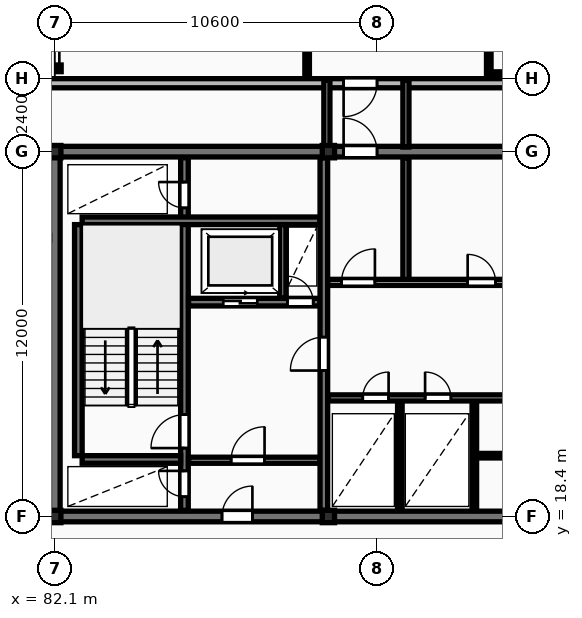
"""IFC4 building model, lengths in metres.
Left out: names, types, materials, properties, quantities, classifications, styles, units other than length and angle.
Written with IfcOpenShell. Run it as: python <this file> out.ifc"""

import sys

from ifc_helpers import new_model, si_unit, direction, frame, frame_2d, origin, origin_2d, place, context, subcontext, project, spatial, rectangle, i_section, extrude, element, fill, save


model = new_model("IFC4")
c1 = context("Model", 3, precision=1e-05, world=origin(), true_north=direction((0.0, 1.0)))
c2 = subcontext(c1, "Body", "Model", "MODEL_VIEW")
j1 = project(units=[si_unit("LENGTHUNIT", "METRE"), si_unit("PLANEANGLEUNIT", "RADIAN")], contexts=[c1])
p1 = place(None, origin())
s1 = spatial("IfcSite", under=j1, at=p1, CompositionType="ELEMENT")
p2 = place(p1, origin())
s2 = spatial("IfcBuilding", under=s1, at=p2, CompositionType="ELEMENT")
p3 = place(p2, frame((0.0, 0.0, 150.1)))
s3 = spatial("IfcBuildingStorey", under=s2, at=p3, CompositionType="ELEMENT", Elevation=150.1)
for number, where, z_axis, x_axis in (
    (1, (82.1, 18.4, 0.0), (0.0, 0.0, 1.0), (1.0, 0.0, 0.0)),
    (2, (82.1, 30.4, 0.0), (0.0, 0.0, 1.0), (1.0, 0.0, 0.0)),
    (3, (91.1, 18.4, 0.0), (0.0, 0.0, 1.0), (1.0, 0.0, 0.0)),
    (4, (91.1, 30.4, 0.0), (0.0, 0.0, 1.0), (1.0, 0.0, 0.0)),
):
    element("IfcColumn", number, at=place(p3, frame(where, z_axis=z_axis, x_axis=x_axis)), inside=s3, PredefinedType="COLUMN", context=c2, shape_type="SweptSolid", body=[
        extrude(i_section(OverallWidth=0.403, OverallDepth=0.406, WebThickness=0.027, FlangeThickness=0.043, FilletRadius=0.015, at=origin_2d()), origin(), (0.0, 0.0, 1.0), 3.6),
    ])
p4 = place(p3, frame((130.7, 32.65, 0.0), z_axis=(0.0, 0.0, 1.0), x_axis=(-1.0, 0.0, 0.0)))
e5 = element("IfcWall", 5, at=p4, inside=s3, PredefinedType="STANDARD", context=c2, shape_type="SweptSolid", body=[
    extrude(rectangle(XDim=58.0, YDim=0.3, at=frame_2d((29.0, 0.0))), origin(), (0.0, 0.0, 1.0), 3.31),
])
p5 = place(p4, frame((50.125, 0.0, 0.85)))
e6 = element("IfcOpeningElement", 6, at=p5, cuts=e5, PredefinedType="OPENING", context=c2, shape_type="SweptSolid", body=[
    extrude(rectangle(XDim=1.8, YDim=1.8, at=frame_2d((0.9, 0.9))), frame((0.0, 0.16, 0.0), z_axis=(0.0, -1.0, 0.0), x_axis=(1.0, 0.0, 0.0)), (0.0, 0.0, 1.0), 0.32),
])
p6 = place(p4, frame((6.775, 0.0, 0.85)))
e7 = element("IfcOpeningElement", 7, at=p6, cuts=e5, PredefinedType="OPENING", context=c2, shape_type="SweptSolid", body=[
    extrude(rectangle(XDim=1.8, YDim=1.8, at=frame_2d((0.9, 0.9))), frame((0.0, 0.16, 0.0), z_axis=(0.0, -1.0, 0.0), x_axis=(1.0, 0.0, 0.0)), (0.0, 0.0, 1.0), 0.32),
])
p7 = place(p4, frame((38.0, 0.0, 0.0)))
e8 = element("IfcOpeningElement", 8, at=p7, cuts=e5, PredefinedType="OPENING", context=c2, shape_type="SweptSolid", body=[
    extrude(rectangle(XDim=1.1, YDim=2.1, at=frame_2d((0.55, 1.05))), frame((0.0, 0.16, 0.0), z_axis=(0.0, -1.0, 0.0), x_axis=(1.0, 0.0, 0.0)), (0.0, 0.0, 1.0), 0.32),
])
p8 = place(p3, frame((81.925, 30.4, 0.0), z_axis=(0.0, 0.0, 1.0), x_axis=(1.0, 0.0, 0.0)))
e9 = element("IfcWall", 9, at=p8, inside=s3, PredefinedType="SHEAR", context=c2, shape_type="SweptSolid", body=[
    extrude(rectangle(XDim=36.265, YDim=0.35, at=frame_2d((18.132, 0.0))), origin(), (0.0, 0.0, 1.0), 3.6),
])
p9 = place(p8, frame((9.675, 0.0, 0.0)))
e10 = element("IfcOpeningElement", 10, at=p9, cuts=e9, PredefinedType="OPENING", context=c2, shape_type="SweptSolid", body=[
    extrude(rectangle(XDim=1.1, YDim=2.1, at=frame_2d((0.55, 1.05))), frame((0.0, 0.185, 0.0), z_axis=(0.0, -1.0, 0.0), x_axis=(1.0, 0.0, 0.0)), (0.0, 0.0, 1.0), 0.37),
])
p10 = place(p3, frame((82.1, 18.575, 0.0), z_axis=(0.0, 0.0, 1.0), x_axis=(0.0, 1.0, 0.0)))
e11 = element("IfcWall", 11, at=p10, inside=s3, PredefinedType="SHEAR", context=c2, shape_type="SweptSolid", body=[
    extrude(rectangle(XDim=11.65, YDim=0.35, at=frame_2d((5.825, 0.0))), origin(), (0.0, 0.0, 1.0), 3.6),
])
p11 = place(p3, frame((81.925, 18.4, 0.0), z_axis=(0.0, 0.0, 1.0), x_axis=(1.0, 0.0, 0.0)))
e12 = element("IfcWall", 12, at=p11, inside=s3, PredefinedType="SHEAR", context=c2, shape_type="SweptSolid", body=[
    extrude(rectangle(XDim=36.265, YDim=0.35, at=frame_2d((18.132, 0.0))), origin(), (0.0, 0.0, 1.0), 3.6),
])
p12 = place(p11, frame((5.675, 0.0, 0.0)))
e13 = element("IfcOpeningElement", 13, at=p12, cuts=e12, PredefinedType="OPENING", context=c2, shape_type="SweptSolid", body=[
    extrude(rectangle(XDim=1.0, YDim=2.15, at=frame_2d((0.5, 1.075))), frame((0.0, 0.185, 0.0), z_axis=(0.0, -1.0, 0.0), x_axis=(1.0, 0.0, 0.0)), (0.0, 0.0, 1.0), 0.37),
])
p13 = place(p11, frame((21.925, 0.0, 0.0)))
e14 = element("IfcOpeningElement", 14, at=p13, cuts=e12, PredefinedType="OPENING", context=c2, shape_type="SweptSolid", body=[
    extrude(rectangle(XDim=1.5, YDim=2.2, at=frame_2d((0.75, 1.1))), frame((0.0, 0.185, 0.0), z_axis=(0.0, -1.0, 0.0), x_axis=(1.0, 0.0, 0.0)), (0.0, 0.0, 1.0), 0.37),
])
p14 = place(p11, frame((29.875, 0.0, 0.0)))
e15 = element("IfcOpeningElement", 15, at=p14, cuts=e12, PredefinedType="OPENING", context=c2, shape_type="SweptSolid", body=[
    extrude(rectangle(XDim=1.0, YDim=2.15, at=frame_2d((0.5, 1.075))), frame((0.0, 0.185, 0.0), z_axis=(0.0, -1.0, 0.0), x_axis=(1.0, 0.0, 0.0)), (0.0, 0.0, 1.0), 0.37),
])
p15 = place(p3, frame((82.875, 20.4, 0.0), z_axis=(0.0, 0.0, 1.0), x_axis=(0.0, 1.0, 0.0)))
e16 = element("IfcWall", 16, at=p15, inside=s3, PredefinedType="SHEAR", context=c2, shape_type="SweptSolid", body=[
    extrude(rectangle(XDim=7.6, YDim=0.25, at=frame_2d((3.8, 0.0))), origin(), (0.0, 0.0, 1.0), 3.6),
])
p16 = place(p3, frame((86.365, 18.6, 0.0), z_axis=(0.0, 0.0, 1.0), x_axis=(0.0, 1.0, 0.0)))
e17 = element("IfcWall", 17, at=p16, inside=s3, PredefinedType="SHEAR", context=c2, shape_type="SweptSolid", body=[
    extrude(rectangle(XDim=11.6, YDim=0.25, at=frame_2d((5.8, 0.0))), origin(), (0.0, 0.0, 1.0), 3.6),
])
p17 = place(p16, frame((0.45, 0.0, 0.0)))
e18 = element("IfcOpeningElement", 18, at=p17, cuts=e17, PredefinedType="OPENING", context=c2, shape_type="SweptSolid", body=[
    extrude(rectangle(XDim=0.85, YDim=2.05, at=frame_2d((0.425, 1.025))), frame((0.0, 0.135, 0.0), z_axis=(0.0, -1.0, 0.0), x_axis=(1.0, 0.0, 0.0)), (0.0, 0.0, 1.0), 0.27),
])
p18 = place(p16, frame((2.05, 0.0, 0.0)))
e19 = element("IfcOpeningElement", 19, at=p18, cuts=e17, PredefinedType="OPENING", context=c2, shape_type="SweptSolid", body=[
    extrude(rectangle(XDim=1.1, YDim=2.1, at=frame_2d((0.55, 1.05))), frame((0.0, 0.135, 0.0), z_axis=(0.0, -1.0, 0.0), x_axis=(1.0, 0.0, 0.0)), (0.0, 0.0, 1.0), 0.27),
])
p19 = place(p16, frame((9.95, 0.0, 0.0)))
e20 = element("IfcOpeningElement", 20, at=p19, cuts=e17, PredefinedType="OPENING", context=c2, shape_type="SweptSolid", body=[
    extrude(rectangle(XDim=0.85, YDim=2.05, at=frame_2d((0.425, 1.025))), frame((0.0, 0.135, 0.0), z_axis=(0.0, -1.0, 0.0), x_axis=(1.0, 0.0, 0.0)), (0.0, 0.0, 1.0), 0.27),
])
p20 = place(p3, frame((83.0, 20.275, 0.0), z_axis=(0.0, 0.0, 1.0), x_axis=(1.0, 0.0, 0.0)))
e21 = element("IfcWall", 21, at=p20, inside=s3, PredefinedType="SHEAR", context=c2, shape_type="SweptSolid", body=[
    extrude(rectangle(XDim=3.24, YDim=0.25, at=frame_2d((1.62, 0.0))), origin(), (0.0, 0.0, 1.0), 3.6),
])
p21 = place(p3, frame((83.0, 28.125, 0.0), z_axis=(0.0, 0.0, 1.0), x_axis=(1.0, 0.0, 0.0)))
e22 = element("IfcWall", 22, at=p21, inside=s3, PredefinedType="SHEAR", context=c2, shape_type="SweptSolid", body=[
    extrude(rectangle(XDim=7.82, YDim=0.25, at=frame_2d((3.91, 0.0))), origin(), (0.0, 0.0, 1.0), 3.6),
])
p22 = place(p3, frame((86.5, 25.45, 0.0), z_axis=(0.0, 0.0, 1.0), x_axis=(1.0, 0.0, 0.0)))
e23 = element("IfcWall", 23, at=p22, inside=s3, PredefinedType="SHEAR", context=c2, shape_type="SweptSolid", body=[
    extrude(rectangle(XDim=4.32, YDim=0.25, at=frame_2d((2.16, 0.0))), origin(), (0.0, 0.0, 1.0), 3.6),
])
p23 = place(p22, frame((1.14, 0.0, 0.0)))
e24 = element("IfcOpeningElement", 24, at=p23, cuts=e23, PredefinedType="OPENING", context=c2, shape_type="SweptSolid", body=[
    extrude(rectangle(XDim=1.12, YDim=2.12, at=frame_2d((0.56, 1.06))), frame((0.0, 0.135, 0.0), z_axis=(0.0, -1.0, 0.0), x_axis=(1.0, 0.0, 0.0)), (0.0, 0.0, 1.0), 0.27),
])
p24 = place(p22, frame((3.25, 0.0, 0.0)))
e25 = element("IfcOpeningElement", 25, at=p24, cuts=e23, PredefinedType="OPENING", context=c2, shape_type="SweptSolid", body=[
    extrude(rectangle(XDim=0.85, YDim=2.05, at=frame_2d((0.425, 1.025))), frame((0.0, 0.135, 0.0), z_axis=(0.0, -1.0, 0.0), x_axis=(1.0, 0.0, 0.0)), (0.0, 0.0, 1.0), 0.27),
])
p25 = place(p3, frame((89.6, 25.58, 0.0), z_axis=(0.0, 0.0, 1.0), x_axis=(0.0, 1.0, 0.0)))
e26 = element("IfcWall", 26, at=p25, inside=s3, PredefinedType="PARTITIONING", context=c2, shape_type="SweptSolid", body=[
    extrude(rectangle(XDim=2.42, YDim=0.2, at=frame_2d((1.21, 0.0))), origin(), (0.0, 0.0, 1.0), 3.31),
])
p26 = place(p3, frame((86.5, 20.25, 0.0), z_axis=(0.0, 0.0, 1.0), x_axis=(1.0, 0.0, 0.0)))
e27 = element("IfcWall", 27, at=p26, inside=s3, PredefinedType="PARTITIONING", context=c2, shape_type="SweptSolid", body=[
    extrude(rectangle(XDim=4.32, YDim=0.2, at=frame_2d((2.16, 0.0))), origin(), (0.0, 0.0, 1.0), 3.31),
])
p27 = place(p26, frame((1.4, 0.0, 0.0)))
e28 = element("IfcOpeningElement", 28, at=p27, cuts=e27, PredefinedType="OPENING", context=c2, shape_type="SweptSolid", body=[
    extrude(rectangle(XDim=1.1, YDim=2.1, at=frame_2d((0.55, 1.05))), frame((0.0, 0.11, 0.0), z_axis=(0.0, -1.0, 0.0), x_axis=(1.0, 0.0, 0.0)), (0.0, 0.0, 1.0), 0.22),
])
p28 = place(p3, frame((90.95, 18.6, 0.0), z_axis=(0.0, 0.0, 1.0), x_axis=(0.0, 1.0, 0.0)))
e29 = element("IfcWall", 29, at=p28, inside=s3, PredefinedType="SHEAR", context=c2, shape_type="SweptSolid", body=[
    extrude(rectangle(XDim=11.6, YDim=0.25, at=frame_2d((5.8, 0.0))), origin(), (0.0, 0.0, 1.0), 3.6),
])
p29 = place(p28, frame((4.6, 0.0, 0.0)))
e30 = element("IfcOpeningElement", 30, at=p29, cuts=e29, PredefinedType="OPENING", context=c2, shape_type="SweptSolid", body=[
    extrude(rectangle(XDim=1.1, YDim=2.1, at=frame_2d((0.55, 1.05))), frame((0.0, 0.135, 0.0), z_axis=(0.0, -1.0, 0.0), x_axis=(1.0, 0.0, 0.0)), (0.0, 0.0, 1.0), 0.27),
])
p30 = place(p3, frame((93.65, 26.1, 0.0), z_axis=(0.0, 0.0, 1.0), x_axis=(0.0, 1.0, 0.0)))
e31 = element("IfcWall", 31, at=p30, inside=s3, PredefinedType="PARTITIONING", context=c2, shape_type="SweptSolid", body=[
    extrude(rectangle(XDim=4.1, YDim=0.2, at=frame_2d((2.05, 0.0))), origin(), (0.0, 0.0, 1.0), 3.31),
])
p31 = place(p3, frame((91.08, 26.1, 0.0), z_axis=(0.0, 0.0, 1.0), x_axis=(1.0, 0.0, 0.0)))
e32 = element("IfcWall", 32, at=p31, inside=s3, PredefinedType="PARTITIONING", context=c2, shape_type="SweptSolid", body=[
    extrude(rectangle(XDim=8.34, YDim=0.2, at=frame_2d((4.17, 0.0))), origin(), (0.0, 0.0, 1.0), 3.31),
])
p32 = place(p31, frame((0.45, 0.0, 0.0)))
e33 = element("IfcOpeningElement", 33, at=p32, cuts=e32, PredefinedType="OPENING", context=c2, shape_type="SweptSolid", body=[
    extrude(rectangle(XDim=1.1, YDim=2.1, at=frame_2d((0.55, 1.05))), frame((0.0, 0.11, 0.0), z_axis=(0.0, -1.0, 0.0), x_axis=(1.0, 0.0, 0.0)), (0.0, 0.0, 1.0), 0.22),
])
p33 = place(p31, frame((4.6, 0.0, 0.0)))
e34 = element("IfcOpeningElement", 34, at=p33, cuts=e32, PredefinedType="OPENING", context=c2, shape_type="SweptSolid", body=[
    extrude(rectangle(XDim=0.92, YDim=2.08, at=frame_2d((0.46, 1.04))), frame((0.0, 0.11, 0.0), z_axis=(0.0, -1.0, 0.0), x_axis=(1.0, 0.0, 0.0)), (0.0, 0.0, 1.0), 0.22),
])
for number, where, z_axis, x_axis in (
    (35, (93.45, 18.6, 0.0), (0.0, 0.0, 1.0), (0.0, 1.0, 0.0)),
    (36, (95.9, 18.6, 0.0), (0.0, 0.0, 1.0), (0.0, 1.0, 0.0)),
):
    element("IfcWall", number, at=place(p3, frame(where, z_axis=z_axis, x_axis=x_axis)), inside=s3, PredefinedType="PARTITIONING", context=c2, shape_type="SweptSolid", body=[
        extrude(rectangle(XDim=3.6, YDim=0.15, at=frame_2d((1.8, 0.0))), origin(), (0.0, 0.0, 1.0), 3.31),
    ])
p34 = place(p3, frame((95.9, 20.4, 0.0), z_axis=(0.0, 0.0, 1.0), x_axis=(1.0, 0.0, 0.0)))
e37 = element("IfcWall", 37, at=p34, inside=s3, PredefinedType="PARTITIONING", context=c2, shape_type="SweptSolid", body=[
    extrude(rectangle(XDim=6.7, YDim=0.15, at=frame_2d((3.35, 0.0))), origin(), (0.0, 0.0, 1.0), 3.31),
])
p35 = place(p34, frame((1.6, 0.0, 0.0)))
e38 = element("IfcOpeningElement", 38, at=p35, cuts=e37, PredefinedType="OPENING", context=c2, shape_type="SweptSolid", body=[
    extrude(rectangle(XDim=0.88, YDim=2.06, at=frame_2d((0.44, 1.03))), frame((0.0, 0.085, 0.0), z_axis=(0.0, -1.0, 0.0), x_axis=(1.0, 0.0, 0.0)), (0.0, 0.0, 1.0), 0.17),
])
p36 = place(p3, frame((91.08, 22.3, 0.0), z_axis=(0.0, 0.0, 1.0), x_axis=(1.0, 0.0, 0.0)))
e39 = element("IfcWall", 39, at=p36, inside=s3, PredefinedType="PARTITIONING", context=c2, shape_type="SweptSolid", body=[
    extrude(rectangle(XDim=19.14, YDim=0.2, at=frame_2d((9.57, 0.0))), origin(), (0.0, 0.0, 1.0), 3.31),
])
p37 = place(p36, frame((1.15, 0.0, 0.0)))
e40 = element("IfcOpeningElement", 40, at=p37, cuts=e39, PredefinedType="OPENING", context=c2, shape_type="SweptSolid", body=[
    extrude(rectangle(XDim=0.85, YDim=2.05, at=frame_2d((0.425, 1.025))), frame((0.0, 0.11, 0.0), z_axis=(0.0, -1.0, 0.0), x_axis=(1.0, 0.0, 0.0)), (0.0, 0.0, 1.0), 0.22),
])
p38 = place(p36, frame((3.2, 0.0, 0.0)))
e41 = element("IfcOpeningElement", 41, at=p38, cuts=e39, PredefinedType="OPENING", context=c2, shape_type="SweptSolid", body=[
    extrude(rectangle(XDim=0.85, YDim=2.05, at=frame_2d((0.425, 1.025))), frame((0.0, 0.11, 0.0), z_axis=(0.0, -1.0, 0.0), x_axis=(1.0, 0.0, 0.0)), (0.0, 0.0, 1.0), 0.22),
])
p39 = place(p36, frame((12.72, 0.0, 0.0)))
e42 = element("IfcOpeningElement", 42, at=p39, cuts=e39, PredefinedType="OPENING", context=c2, shape_type="SweptSolid", body=[
    extrude(rectangle(XDim=1.5, YDim=2.2, at=frame_2d((0.75, 1.1))), frame((0.0, 0.11, 0.0), z_axis=(0.0, -1.0, 0.0), x_axis=(1.0, 0.0, 0.0)), (0.0, 0.0, 1.0), 0.22),
])
p40 = place(p36, frame((6.42, 0.0, 0.0)))
e43 = element("IfcOpeningElement", 43, at=p40, cuts=e39, PredefinedType="OPENING", context=c2, shape_type="SweptSolid", body=[
    extrude(rectangle(XDim=0.92, YDim=2.08, at=frame_2d((0.46, 1.04))), frame((0.0, 0.11, 0.0), z_axis=(0.0, -1.0, 0.0), x_axis=(1.0, 0.0, 0.0)), (0.0, 0.0, 1.0), 0.22),
])
p41 = place(p36, frame((15.92, 0.0, 0.0)))
e44 = element("IfcOpeningElement", 44, at=p41, cuts=e39, PredefinedType="OPENING", context=c2, shape_type="SweptSolid", body=[
    extrude(rectangle(XDim=0.88, YDim=2.06, at=frame_2d((0.44, 1.03))), frame((0.0, 0.11, 0.0), z_axis=(0.0, -1.0, 0.0), x_axis=(1.0, 0.0, 0.0)), (0.0, 0.0, 1.0), 0.22),
])
p42 = place(p3, frame((91.05, 30.55, 0.0), z_axis=(0.0, 0.0, 1.0), x_axis=(0.0, 1.0, 0.0)))
e45 = element("IfcWall", 45, at=p42, inside=s3, PredefinedType="PARTITIONING", context=c2, shape_type="SweptSolid", body=[
    extrude(rectangle(XDim=2.2, YDim=0.2, at=frame_2d((1.1, 0.0))), origin(), (0.0, 0.0, 1.0), 3.31),
])
p43 = place(p3, frame((93.65, 30.55, 0.0), z_axis=(0.0, 0.0, 1.0), x_axis=(0.0, 1.0, 0.0)))
e46 = element("IfcWall", 46, at=p43, inside=s3, PredefinedType="PARTITIONING", context=c2, shape_type="SweptSolid", body=[
    extrude(rectangle(XDim=2.2, YDim=0.2, at=frame_2d((1.1, 0.0))), origin(), (0.0, 0.0, 1.0), 2.389),
])
p44 = place(p3, frame((96.375, 32.95, 0.0), z_axis=(0.0, 0.0, 1.0), x_axis=(1.0, 0.0, 0.0)))
e47 = element("IfcWall", 47, at=p44, inside=s3, PredefinedType="PARTITIONING", context=c2, shape_type="SweptSolid", body=[
    extrude(rectangle(XDim=3.31, YDim=0.15, at=frame_2d((1.655, 0.0))), origin(), (0.0, 0.0, 1.0), 2.69),
])
p45 = place(p3, frame((96.375, 32.95, 0.0), z_axis=(0.0, 0.0, 1.0), x_axis=(0.0, 1.0, 0.0)))
e48 = element("IfcWall", 48, at=p45, inside=s3, PredefinedType="PARTITIONING", context=c2, shape_type="SweptSolid", body=[
    extrude(rectangle(XDim=4.725, YDim=0.15, at=frame_2d((2.363, 0.0))), origin(), (0.0, 0.0, 1.0), 2.389),
])
p46 = place(p45, frame((1.6, 0.0, 0.0)))
e49 = element("IfcOpeningElement", 49, at=p46, cuts=e48, PredefinedType="OPENING", context=c2, shape_type="SweptSolid", body=[
    extrude(rectangle(XDim=0.96, YDim=2.1, at=frame_2d((0.48, 1.05))), frame((0.0, 0.085, 0.0), z_axis=(0.0, -1.0, 0.0), x_axis=(1.0, 0.0, 0.0)), (0.0, 0.0, 1.0), 0.17),
])
p47 = place(p3, frame((90.4, 32.9, 0.0), z_axis=(0.0, 0.0, 1.0), x_axis=(0.0, 1.0, 0.0)))
e50 = element("IfcWall", 50, at=p47, inside=s3, PredefinedType="PARTITIONING", context=c2, shape_type="SweptSolid", body=[
    extrude(rectangle(XDim=17.8, YDim=0.15, at=frame_2d((8.9, 0.0))), origin(), (0.0, 0.0, 1.0), 3.31),
])
p48 = place(p47, frame((8.2, 0.0, 0.0)))
e51 = element("IfcOpeningElement", 51, at=p48, cuts=e50, PredefinedType="OPENING", context=c2, shape_type="SweptSolid", body=[
    extrude(rectangle(XDim=1.22, YDim=2.18, at=frame_2d((0.61, 1.09))), frame((0.0, 0.085, 0.0), z_axis=(0.0, -1.0, 0.0), x_axis=(1.0, 0.0, 0.0)), (0.0, 0.0, 1.0), 0.17),
])
p49 = place(p7, origin())
e52 = element("IfcDoor", 52, at=p49, inside=s3, OperationType="SINGLE_SWING_RIGHT", PredefinedType="DOOR", context=c2, shape_type="SweptSolid", body=[
    extrude(rectangle(XDim=1.1, YDim=2.1, at=frame_2d((0.55, 1.05))), frame((0.0, 0.025, 0.0), z_axis=(0.0, -1.0, 0.0), x_axis=(1.0, 0.0, 0.0)), (0.0, 0.0, 1.0), 0.05),
])
fill(e8, e52)
p50 = place(p9, origin())
e53 = element("IfcDoor", 53, at=p50, inside=s3, OperationType="SINGLE_SWING_LEFT", PredefinedType="DOOR", context=c2, shape_type="SweptSolid", body=[
    extrude(rectangle(XDim=1.1, YDim=2.1, at=frame_2d((0.55, 1.05))), frame((0.0, 0.025, 0.0), z_axis=(0.0, -1.0, 0.0), x_axis=(1.0, 0.0, 0.0)), (0.0, 0.0, 1.0), 0.05),
])
fill(e10, e53)
p51 = place(p12, origin())
e54 = element("IfcDoor", 54, at=p51, inside=s3, OperationType="SINGLE_SWING_RIGHT", PredefinedType="DOOR", context=c2, shape_type="SweptSolid", body=[
    extrude(rectangle(XDim=1.0, YDim=2.15, at=frame_2d((0.5, 1.075))), frame((0.0, 0.025, 0.0), z_axis=(0.0, -1.0, 0.0), x_axis=(1.0, 0.0, 0.0)), (0.0, 0.0, 1.0), 0.05),
])
fill(e13, e54)
p52 = place(p17, origin())
e55 = element("IfcDoor", 55, at=p52, inside=s3, OperationType="SINGLE_SWING_RIGHT", PredefinedType="DOOR", context=c2, shape_type="SweptSolid", body=[
    extrude(rectangle(XDim=0.85, YDim=2.05, at=frame_2d((0.425, 1.025))), frame((0.0, 0.025, 0.0), z_axis=(0.0, -1.0, 0.0), x_axis=(1.0, 0.0, 0.0)), (0.0, 0.0, 1.0), 0.05),
])
fill(e18, e55)
p53 = place(p18, origin())
e56 = element("IfcDoor", 56, at=p53, inside=s3, OperationType="SINGLE_SWING_LEFT", PredefinedType="DOOR", context=c2, shape_type="SweptSolid", body=[
    extrude(rectangle(XDim=1.1, YDim=2.1, at=frame_2d((0.55, 1.05))), frame((0.0, 0.025, 0.0), z_axis=(0.0, -1.0, 0.0), x_axis=(1.0, 0.0, 0.0)), (0.0, 0.0, 1.0), 0.05),
])
fill(e19, e56)
p54 = place(p19, origin())
e57 = element("IfcDoor", 57, at=p54, inside=s3, OperationType="SINGLE_SWING_RIGHT", PredefinedType="DOOR", context=c2, shape_type="SweptSolid", body=[
    extrude(rectangle(XDim=0.85, YDim=2.05, at=frame_2d((0.425, 1.025))), frame((0.0, 0.025, 0.0), z_axis=(0.0, -1.0, 0.0), x_axis=(1.0, 0.0, 0.0)), (0.0, 0.0, 1.0), 0.05),
])
fill(e20, e57)
p55 = place(p23, origin())
e58 = element("IfcDoor", 58, at=p55, inside=s3, OperationType="SLIDING_TO_RIGHT", PredefinedType="DOOR", context=c2, shape_type="SweptSolid", body=[
    extrude(rectangle(XDim=1.12, YDim=2.12, at=frame_2d((0.56, 1.06))), frame((0.0, 0.025, 0.0), z_axis=(0.0, -1.0, 0.0), x_axis=(1.0, 0.0, 0.0)), (0.0, 0.0, 1.0), 0.05),
])
fill(e24, e58)
p56 = place(p24, origin())
e59 = element("IfcDoor", 59, at=p56, inside=s3, OperationType="SINGLE_SWING_LEFT", PredefinedType="DOOR", context=c2, shape_type="SweptSolid", body=[
    extrude(rectangle(XDim=0.85, YDim=2.05, at=frame_2d((0.425, 1.025))), frame((0.0, 0.025, 0.0), z_axis=(0.0, -1.0, 0.0), x_axis=(1.0, 0.0, 0.0)), (0.0, 0.0, 1.0), 0.05),
])
fill(e25, e59)
p57 = place(p27, origin())
e60 = element("IfcDoor", 60, at=p57, inside=s3, OperationType="SINGLE_SWING_RIGHT", PredefinedType="DOOR", context=c2, shape_type="SweptSolid", body=[
    extrude(rectangle(XDim=1.1, YDim=2.1, at=frame_2d((0.55, 1.05))), frame((0.0, 0.025, 0.0), z_axis=(0.0, -1.0, 0.0), x_axis=(1.0, 0.0, 0.0)), (0.0, 0.0, 1.0), 0.05),
])
fill(e28, e60)
p58 = place(p29, origin())
e61 = element("IfcDoor", 61, at=p58, inside=s3, OperationType="SINGLE_SWING_LEFT", PredefinedType="DOOR", context=c2, shape_type="SweptSolid", body=[
    extrude(rectangle(XDim=1.1, YDim=2.1, at=frame_2d((0.55, 1.05))), frame((0.0, 0.025, 0.0), z_axis=(0.0, -1.0, 0.0), x_axis=(1.0, 0.0, 0.0)), (0.0, 0.0, 1.0), 0.05),
])
fill(e30, e61)
p59 = place(p32, origin())
e62 = element("IfcDoor", 62, at=p59, inside=s3, OperationType="SINGLE_SWING_RIGHT", PredefinedType="DOOR", context=c2, shape_type="SweptSolid", body=[
    extrude(rectangle(XDim=1.1, YDim=2.1, at=frame_2d((0.55, 1.05))), frame((0.0, 0.025, 0.0), z_axis=(0.0, -1.0, 0.0), x_axis=(1.0, 0.0, 0.0)), (0.0, 0.0, 1.0), 0.05),
])
fill(e33, e62)
p60 = place(p33, origin())
e63 = element("IfcDoor", 63, at=p60, inside=s3, OperationType="SINGLE_SWING_LEFT", PredefinedType="DOOR", context=c2, shape_type="SweptSolid", body=[
    extrude(rectangle(XDim=0.92, YDim=2.08, at=frame_2d((0.46, 1.04))), frame((0.0, 0.025, 0.0), z_axis=(0.0, -1.0, 0.0), x_axis=(1.0, 0.0, 0.0)), (0.0, 0.0, 1.0), 0.05),
])
fill(e34, e63)
p61 = place(p37, origin())
e64 = element("IfcDoor", 64, at=p61, inside=s3, OperationType="SINGLE_SWING_RIGHT", PredefinedType="DOOR", context=c2, shape_type="SweptSolid", body=[
    extrude(rectangle(XDim=0.85, YDim=2.05, at=frame_2d((0.425, 1.025))), frame((0.0, 0.025, 0.0), z_axis=(0.0, -1.0, 0.0), x_axis=(1.0, 0.0, 0.0)), (0.0, 0.0, 1.0), 0.05),
])
fill(e40, e64)
p62 = place(p38, origin())
e65 = element("IfcDoor", 65, at=p62, inside=s3, OperationType="SINGLE_SWING_LEFT", PredefinedType="DOOR", context=c2, shape_type="SweptSolid", body=[
    extrude(rectangle(XDim=0.85, YDim=2.05, at=frame_2d((0.425, 1.025))), frame((0.0, 0.025, 0.0), z_axis=(0.0, -1.0, 0.0), x_axis=(1.0, 0.0, 0.0)), (0.0, 0.0, 1.0), 0.05),
])
fill(e41, e65)
save(model, sys.argv[1])
